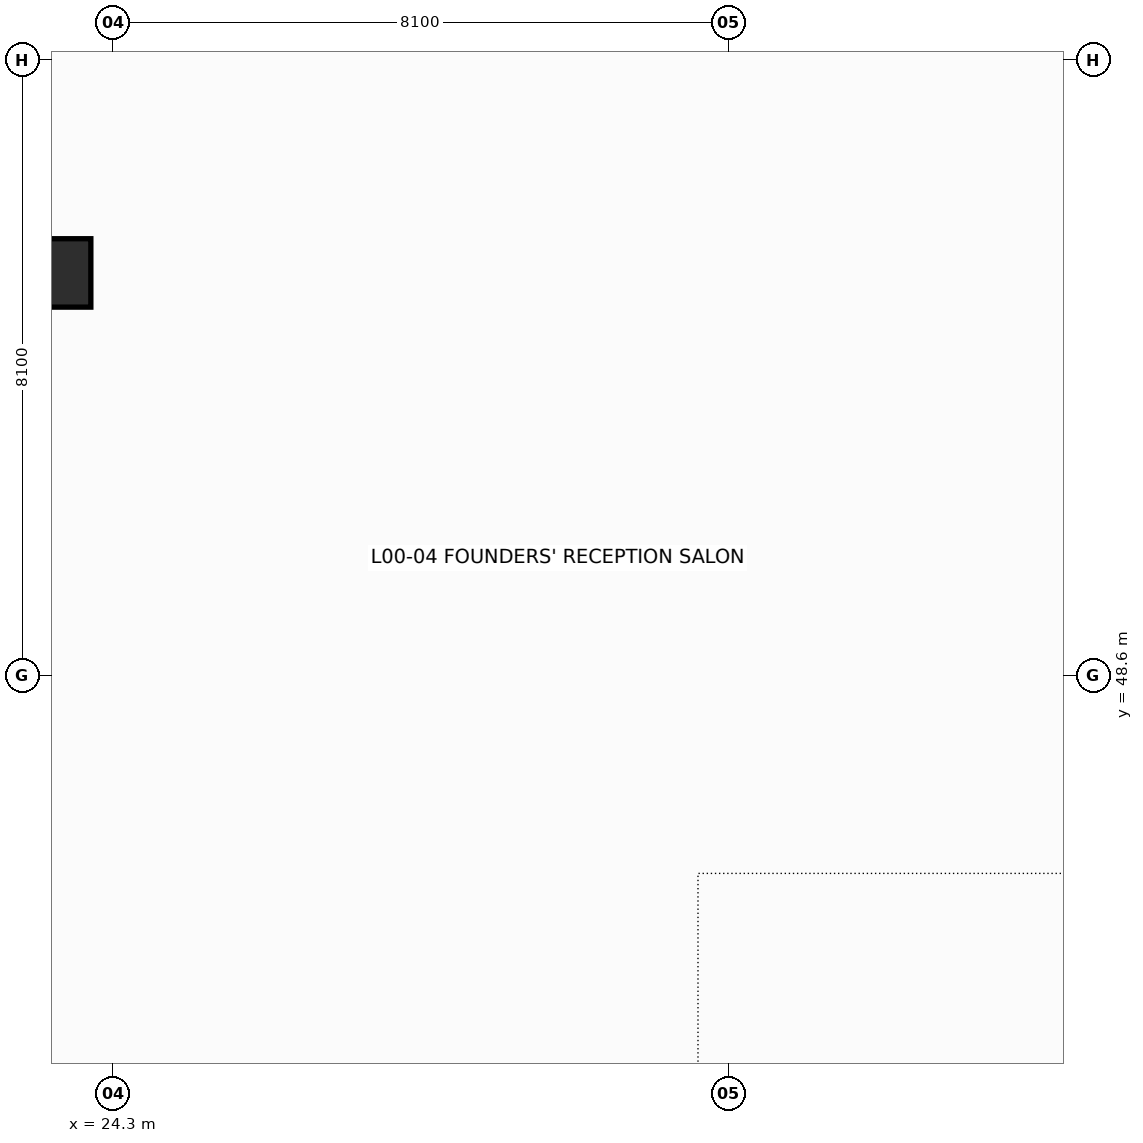
"""IFC4 building model, lengths in metres.
Left out: names, types, materials, properties, quantities, classifications, styles, units other than length and angle.
Written with IfcOpenShell. Run it as: python <this file> out.ifc"""

import sys

from ifc_helpers import new_model, si_unit, direction, frame, origin, origin_2d, place, context, subcontext, project, spatial, rectangle, extrude, element, save


model = new_model("IFC4")
c1 = context("Model", 3, precision=1e-05, world=origin(), true_north=direction((0.0, 1.0)))
c2 = subcontext(c1, "Body", "Model", "MODEL_VIEW")
j1 = project(units=[si_unit("LENGTHUNIT", "METRE"), si_unit("PLANEANGLEUNIT", "RADIAN")], contexts=[c1])
p1 = place(None, origin())
s1 = spatial("IfcSite", under=j1, at=p1, CompositionType="ELEMENT")
p2 = place(p1, origin())
s2 = spatial("IfcBuilding", under=s1, at=p2, CompositionType="ELEMENT")
p3 = place(p2, origin())
s3 = spatial("IfcBuildingStorey", under=s2, at=p3, CompositionType="ELEMENT", Elevation=0.0)
p4 = place(p3, frame((23.562, 53.9, 0.0), z_axis=(0.0, 0.0, 1.0), x_axis=(1.0, 0.0, 0.0)))
e1 = element("IfcColumn", 1, at=p4, inside=s3, PredefinedType="COLUMN", context=c2, shape_type="SweptSolid", body=[
    extrude(rectangle(XDim=0.9, YDim=0.9, at=origin_2d()), origin(), (0.0, 0.0, 1.0), 5.4),
])
save(model, sys.argv[1])
